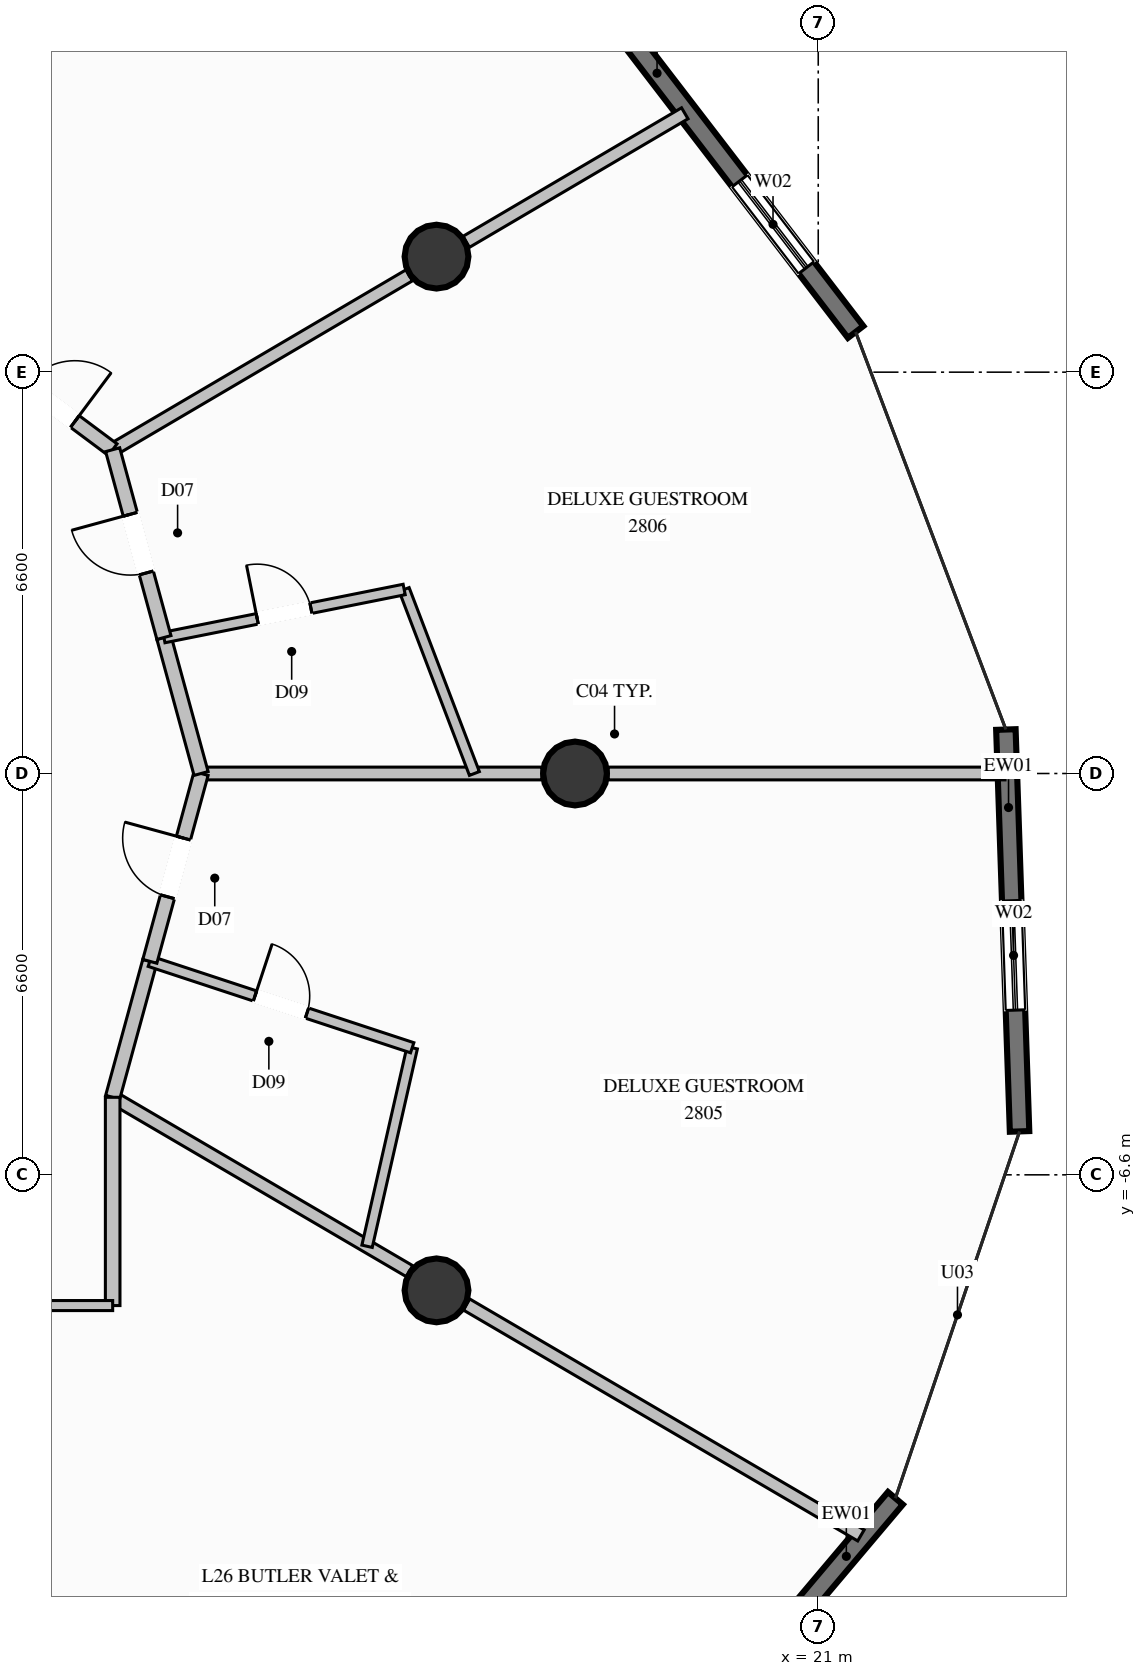
"""IFC4 building model, lengths in metres.
Left out: names, types, materials, properties, quantities, classifications, styles, units other than length and angle.
Written with IfcOpenShell. Run it as: python <this file> out.ifc"""

import sys

from ifc_helpers import new_model, si_unit, direction, frame, frame_2d, origin, origin_2d, place, context, subcontext, project, spatial, rectangle, circle, extrude, element, fill, save


model = new_model("IFC4")
c1 = context("Model", 3, precision=1e-05, world=origin(), true_north=direction((0.0, 1.0)))
c2 = subcontext(c1, "Body", "Model", "MODEL_VIEW")
j1 = project(units=[si_unit("LENGTHUNIT", "METRE"), si_unit("PLANEANGLEUNIT", "RADIAN")], contexts=[c1])
p1 = place(None, origin())
s1 = spatial("IfcSite", under=j1, at=p1, CompositionType="ELEMENT")
p2 = place(p1, origin())
s2 = spatial("IfcBuilding", under=s1, at=p2, CompositionType="ELEMENT")
p3 = place(p2, frame((0.0, 0.0, 106.2)))
s3 = spatial("IfcBuildingStorey", under=s2, at=p3, CompositionType="ELEMENT", Elevation=106.2)
for number, where, z_axis, x_axis in (
    (1, (17.0, 0.0, 0.0), (0.0, 0.0, 1.0), (1.0, 0.0, 0.0)),
    (2, (14.722, 8.5, 0.0), (0.0, 0.0, 1.0), (1.0, 0.0, 0.0)),
    (3, (14.722, -8.5, 0.0), (0.0, 0.0, 1.0), (1.0, 0.0, 0.0)),
):
    element("IfcColumn", number, at=place(p3, frame(where, z_axis=z_axis, x_axis=x_axis)), inside=s3, PredefinedType="COLUMN", context=c2, shape_type="SweptSolid", body=[
        extrude(circle(Radius=0.525, at=origin_2d()), origin(), (0.0, 0.0, 1.0), 3.6),
    ])
p4 = place(p3, frame((24.086, 0.723, 0.0), z_axis=(0.0, 0.0, 1.0), x_axis=(0.034040106065, -0.999420467661, 0.0)))
e4 = element("IfcWall", 4, at=p4, inside=s3, PredefinedType="SOLIDWALL", context=c2, shape_type="SweptSolid", body=[
    extrude(rectangle(XDim=6.613, YDim=0.32, at=frame_2d((3.306, 0.0))), origin(), (0.0, 0.0, 1.0), 3.35),
])
p5 = place(p4, frame((2.817, 0.0, 0.35)))
e5 = element("IfcOpeningElement", 5, at=p5, cuts=e4, PredefinedType="OPENING", context=c2, shape_type="SweptSolid", body=[
    extrude(rectangle(XDim=1.8, YDim=2.6, at=frame_2d((0.9, 1.3))), frame((0.0, 0.17, 0.0), z_axis=(0.0, -1.0, 0.0), x_axis=(1.0, 0.0, 0.0)), (0.0, 0.0, 1.0), 0.34),
])
p6 = place(p3, frame((17.142, 13.089, 0.0), z_axis=(0.0, 0.0, 1.0), x_axis=(0.608831916989, -0.793299247986, 0.0)))
e6 = element("IfcWall", 6, at=p6, inside=s3, PredefinedType="SOLIDWALL", context=c2, shape_type="SweptSolid", body=[
    extrude(rectangle(XDim=7.347, YDim=0.32, at=frame_2d((3.673, 0.0))), origin(), (0.0, 0.0, 1.0), 3.35),
])
p7 = place(p6, frame((4.215, 0.0, 0.35)))
e7 = element("IfcOpeningElement", 7, at=p7, cuts=e6, PredefinedType="OPENING", context=c2, shape_type="SweptSolid", body=[
    extrude(rectangle(XDim=1.8, YDim=2.6, at=frame_2d((0.9, 1.3))), frame((0.0, 0.17, 0.0), z_axis=(0.0, -1.0, 0.0), x_axis=(1.0, 0.0, 0.0)), (0.0, 0.0, 1.0), 0.34),
])
p8 = place(p3, frame((22.269, -11.919, 0.0), z_axis=(0.0, 0.0, 1.0), x_axis=(-0.645278763483, -0.763947195425, 0.0)))
e8 = element("IfcWall", 8, at=p8, inside=s3, PredefinedType="SOLIDWALL", context=c2, shape_type="SweptSolid", body=[
    extrude(rectangle(XDim=6.369, YDim=0.32, at=frame_2d((3.185, 0.0))), origin(), (0.0, 0.0, 1.0), 3.35),
])
p9 = place(p8, frame((2.751, 0.0, 0.35)))
e9 = element("IfcOpeningElement", 9, at=p9, cuts=e8, PredefinedType="OPENING", context=c2, shape_type="SweptSolid", body=[
    extrude(rectangle(XDim=1.8, YDim=2.6, at=frame_2d((0.9, 1.3))), frame((0.0, 0.17, 0.0), z_axis=(0.0, -1.0, 0.0), x_axis=(1.0, 0.0, 0.0)), (0.0, 0.0, 1.0), 0.34),
])
p10 = place(p3, frame((10.85, 0.0, 0.0), z_axis=(0.0, 0.0, 1.0), x_axis=(1.0, 0.0, 0.0)))
e10 = element("IfcWall", 10, at=p10, inside=s3, PredefinedType="PARTITIONING", context=c2, shape_type="SweptSolid", body=[
    extrude(rectangle(XDim=5.605, YDim=0.21, at=frame_2d((2.802, 0.0))), origin(), (0.0, 0.0, 1.0), 3.35),
])
p11 = place(p3, frame((17.545, 0.0, 0.0), z_axis=(0.0, 0.0, 1.0), x_axis=(1.0, 0.0, 0.0)))
e11 = element("IfcWall", 11, at=p11, inside=s3, PredefinedType="PARTITIONING", context=c2, shape_type="SweptSolid", body=[
    extrude(rectangle(XDim=6.526, YDim=0.21, at=frame_2d((3.263, 0.0))), origin(), (0.0, 0.0, 1.0), 3.35),
])
p12 = place(p3, frame((9.396, 5.325, 0.0), z_axis=(0.0, 0.0, 1.0), x_axis=(0.862032950085, 0.506852239778, 0.0)))
e12 = element("IfcWall", 12, at=p12, inside=s3, PredefinedType="PARTITIONING", context=c2, shape_type="SweptSolid", body=[
    extrude(rectangle(XDim=5.656, YDim=0.21, at=frame_2d((2.828, 0.0))), origin(), (0.0, 0.0, 1.0), 2.719),
])
p13 = place(p3, frame((15.21, 8.743, 0.0), z_axis=(0.0, 0.0, 1.0), x_axis=(0.862004936616, 0.506899880894, 0.0)))
e13 = element("IfcWall", 13, at=p13, inside=s3, PredefinedType="PARTITIONING", context=c2, shape_type="SweptSolid", body=[
    extrude(rectangle(XDim=4.17, YDim=0.21, at=frame_2d((2.085, 0.0))), origin(), (0.0, 0.0, 1.0), 3.35),
])
p14 = place(p3, frame((9.396, -5.325, 0.0), z_axis=(0.0, 0.0, 1.0), x_axis=(0.862912125579, -0.505353998232, 0.0)))
e14 = element("IfcWall", 14, at=p14, inside=s3, PredefinedType="PARTITIONING", context=c2, shape_type="SweptSolid", body=[
    extrude(rectangle(XDim=5.658, YDim=0.21, at=frame_2d((2.829, 0.0))), origin(), (0.0, 0.0, 1.0), 2.719),
])
p15 = place(p3, frame((15.215, -8.732, 0.0), z_axis=(0.0, 0.0, 1.0), x_axis=(0.862960241997, -0.505271828556, 0.0)))
e15 = element("IfcWall", 15, at=p15, inside=s3, PredefinedType="PARTITIONING", context=c2, shape_type="SweptSolid", body=[
    extrude(rectangle(XDim=7.517, YDim=0.21, at=frame_2d((3.758, 0.0))), origin(), (0.0, 0.0, 1.0), 3.35),
])
p16 = place(p3, frame((7.35, 6.85, 0.0), z_axis=(0.0, 0.0, 1.0), x_axis=(0.8017416961, -0.597670689205, 0.0)))
e16 = element("IfcWall", 16, at=p16, inside=s3, PredefinedType="PARTITIONING", context=c2, shape_type="SweptSolid", body=[
    extrude(rectangle(XDim=2.552, YDim=0.24, at=frame_2d((1.276, 0.0))), origin(), (0.0, 0.0, 1.0), 3.35),
])
p17 = place(p16, frame((0.776, 0.0, 0.0)))
e17 = element("IfcOpeningElement", 17, at=p17, cuts=e16, PredefinedType="OPENING", context=c2, shape_type="SweptSolid", body=[
    extrude(rectangle(XDim=1.0, YDim=2.2, at=frame_2d((0.5, 1.1))), frame((0.0, 0.13, 0.0), z_axis=(0.0, -1.0, 0.0), x_axis=(1.0, 0.0, 0.0)), (0.0, 0.0, 1.0), 0.26),
])
p18 = place(p3, frame((9.396, -5.325, 0.0), z_axis=(0.0, 0.0, 1.0), x_axis=(0.263643210908, 0.964620265878, 0.0)))
e18 = element("IfcWall", 18, at=p18, inside=s3, PredefinedType="PARTITIONING", context=c2, shape_type="SweptSolid", body=[
    extrude(rectangle(XDim=2.318, YDim=0.24, at=frame_2d((1.159, 0.0))), origin(), (0.0, 0.0, 1.0), 3.35),
])
p19 = place(p3, frame((13.58, -7.775, 0.0), z_axis=(0.0, 0.0, 1.0), x_axis=(0.221599041774, 0.975137869578, 0.0)))
e19 = element("IfcWall", 19, at=p19, inside=s3, PredefinedType="PLUMBINGWALL", context=c2, shape_type="SweptSolid", body=[
    extrude(rectangle(XDim=3.348, YDim=0.175, at=frame_2d((1.674, 0.0))), origin(), (0.0, 0.0, 1.0), 3.35),
])
p20 = place(p3, frame((10.007, -3.089, 0.0), z_axis=(0.0, 0.0, 1.0), x_axis=(0.949827092004, -0.312775471057, 0.0)))
e20 = element("IfcWall", 20, at=p20, inside=s3, PredefinedType="PLUMBINGWALL", context=c2, shape_type="SweptSolid", body=[
    extrude(rectangle(XDim=4.543, YDim=0.175, at=frame_2d((2.271, 0.0))), origin(), (0.0, 0.0, 1.0), 3.35),
])
p21 = place(p20, frame((1.821, 0.0, 0.0)))
e21 = element("IfcOpeningElement", 21, at=p21, cuts=e20, PredefinedType="OPENING", context=c2, shape_type="SweptSolid", body=[
    extrude(rectangle(XDim=0.9, YDim=2.1, at=frame_2d((0.45, 1.05))), frame((0.0, 0.098, 0.0), z_axis=(0.0, -1.0, 0.0), x_axis=(1.0, 0.0, 0.0)), (0.0, 0.0, 1.0), 0.195),
])
p22 = place(p3, frame((10.007, -3.089, 0.0), z_axis=(0.0, 0.0, 1.0), x_axis=(0.263272237376, 0.964721581093, 0.0)))
e22 = element("IfcWall", 22, at=p22, inside=s3, PredefinedType="PARTITIONING", context=c2, shape_type="SweptSolid", body=[
    extrude(rectangle(XDim=3.202, YDim=0.24, at=frame_2d((1.601, 0.0))), origin(), (0.0, 0.0, 1.0), 2.985),
])
p23 = place(p22, frame((1.101, 0.0, 0.0)))
e23 = element("IfcOpeningElement", 23, at=p23, cuts=e22, PredefinedType="OPENING", context=c2, shape_type="SweptSolid", body=[
    extrude(rectangle(XDim=1.0, YDim=2.2, at=frame_2d((0.5, 1.1))), frame((0.0, 0.13, 0.0), z_axis=(0.0, -1.0, 0.0), x_axis=(1.0, 0.0, 0.0)), (0.0, 0.0, 1.0), 0.26),
])
p24 = place(p3, frame((10.85, 0.0, 0.0), z_axis=(0.0, 0.0, 1.0), x_axis=(-0.263616426241, 0.964627586074, 0.0)))
e24 = element("IfcWall", 24, at=p24, inside=s3, PredefinedType="PARTITIONING", context=c2, shape_type="SweptSolid", body=[
    extrude(rectangle(XDim=2.318, YDim=0.24, at=frame_2d((1.159, 0.0))), origin(), (0.0, 0.0, 1.0), 2.985),
])
p25 = place(p3, frame((15.345, 0.0, 0.0), z_axis=(0.0, 0.0, 1.0), x_axis=(-0.35661902988, 0.934249895653, 0.0)))
e25 = element("IfcWall", 25, at=p25, inside=s3, PredefinedType="PLUMBINGWALL", context=c2, shape_type="SweptSolid", body=[
    extrude(rectangle(XDim=3.239, YDim=0.175, at=frame_2d((1.619, 0.0))), origin(), (0.0, 0.0, 1.0), 3.35),
])
p26 = place(p3, frame((10.239, 2.236, 0.0), z_axis=(0.0, 0.0, 1.0), x_axis=(0.980599315693, 0.196022912085, 0.0)))
e26 = element("IfcWall", 26, at=p26, inside=s3, PredefinedType="PLUMBINGWALL", context=c2, shape_type="SweptSolid", body=[
    extrude(rectangle(XDim=4.029, YDim=0.175, at=frame_2d((2.015, 0.0))), origin(), (0.0, 0.0, 1.0), 3.35),
])
p27 = place(p26, frame((1.565, 0.0, 0.0)))
e27 = element("IfcOpeningElement", 27, at=p27, cuts=e26, PredefinedType="OPENING", context=c2, shape_type="SweptSolid", body=[
    extrude(rectangle(XDim=0.9, YDim=2.1, at=frame_2d((0.45, 1.05))), frame((0.0, 0.098, 0.0), z_axis=(0.0, -1.0, 0.0), x_axis=(1.0, 0.0, 0.0)), (0.0, 0.0, 1.0), 0.195),
])
p28 = place(p3, frame((10.239, 2.236, 0.0), z_axis=(0.0, 0.0, 1.0), x_axis=(-0.26329160366, 0.964716295831, 0.0)))
e28 = element("IfcWall", 28, at=p28, inside=s3, PredefinedType="PARTITIONING", context=c2, shape_type="SweptSolid", body=[
    extrude(rectangle(XDim=3.202, YDim=0.24, at=frame_2d((1.601, 0.0))), origin(), (0.0, 0.0, 1.0), 3.35),
])
p29 = place(p28, frame((1.101, 0.0, 0.0)))
e29 = element("IfcOpeningElement", 29, at=p29, cuts=e28, PredefinedType="OPENING", context=c2, shape_type="SweptSolid", body=[
    extrude(rectangle(XDim=1.0, YDim=2.2, at=frame_2d((0.5, 1.1))), frame((0.0, 0.13, 0.0), z_axis=(0.0, -1.0, 0.0), x_axis=(1.0, 0.0, 0.0)), (0.0, 0.0, 1.0), 0.26),
])
p30 = place(p3, frame((5.168, -8.75, 0.0), z_axis=(0.0, 0.0, 1.0), x_axis=(0.319791389232, -0.947487977429, 0.0)))
e30 = element("IfcWall", 30, at=p30, inside=s3, PredefinedType="PARTITIONING", context=c2, shape_type="SweptSolid", body=[
    extrude(rectangle(XDim=12.468, YDim=0.21, at=frame_2d((6.234, 0.0))), origin(), (0.0, 0.0, 1.0), 3.35),
])
p31 = place(p3, frame((9.396, -8.75, 0.0), z_axis=(0.0, 0.0, 1.0), x_axis=(0.0, 1.0, 0.0)))
e31 = element("IfcWall", 31, at=p31, inside=s3, PredefinedType="PARTITIONING", context=c2, shape_type="SweptSolid", body=[
    extrude(rectangle(XDim=3.425, YDim=0.24, at=frame_2d((1.712, 0.0))), origin(), (0.0, 0.0, 1.0), 3.35),
])
p32 = place(p3, frame((5.168, -8.75, 0.0), z_axis=(0.0, 0.0, 1.0), x_axis=(1.0, 0.0, 0.0)))
e32 = element("IfcWall", 32, at=p32, inside=s3, PredefinedType="PARTITIONING", context=c2, shape_type="SweptSolid", body=[
    extrude(rectangle(XDim=4.228, YDim=0.165, at=frame_2d((2.114, 0.0))), origin(), (0.0, 0.0, 1.0), 3.35),
])
p33 = place(p32, frame((1.639, 0.0, 0.0)))
e33 = element("IfcOpeningElement", 33, at=p33, cuts=e32, PredefinedType="OPENING", context=c2, shape_type="SweptSolid", body=[
    extrude(rectangle(XDim=0.95, YDim=2.1, at=frame_2d((0.475, 1.05))), frame((0.0, 0.093, 0.0), z_axis=(0.0, -1.0, 0.0), x_axis=(1.0, 0.0, 0.0)), (0.0, 0.0, 1.0), 0.185),
])
p34 = place(p5, origin())
e34 = element("IfcWindow", 34, at=p34, inside=s3, PartitioningType="SINGLE_PANEL", PredefinedType="WINDOW", context=c2, shape_type="SweptSolid", body=[
    extrude(rectangle(XDim=1.8, YDim=2.6, at=frame_2d((0.9, 1.3))), frame((0.0, 0.03, 0.0), z_axis=(0.0, -1.0, 0.0), x_axis=(1.0, 0.0, 0.0)), (0.0, 0.0, 1.0), 0.06),
])
fill(e5, e34)
p35 = place(p7, origin())
e35 = element("IfcWindow", 35, at=p35, inside=s3, PartitioningType="SINGLE_PANEL", PredefinedType="WINDOW", context=c2, shape_type="SweptSolid", body=[
    extrude(rectangle(XDim=1.8, YDim=2.6, at=frame_2d((0.9, 1.3))), frame((0.0, 0.03, 0.0), z_axis=(0.0, -1.0, 0.0), x_axis=(1.0, 0.0, 0.0)), (0.0, 0.0, 1.0), 0.06),
])
fill(e7, e35)
p36 = place(p17, origin())
e36 = element("IfcDoor", 36, at=p36, inside=s3, OperationType="SINGLE_SWING_RIGHT", PredefinedType="DOOR", context=c2, shape_type="SweptSolid", body=[
    extrude(rectangle(XDim=1.0, YDim=2.2, at=frame_2d((0.5, 1.1))), frame((0.0, 0.025, 0.0), z_axis=(0.0, -1.0, 0.0), x_axis=(1.0, 0.0, 0.0)), (0.0, 0.0, 1.0), 0.05),
])
fill(e17, e36)
p37 = place(p21, origin())
e37 = element("IfcDoor", 37, at=p37, inside=s3, OperationType="SINGLE_SWING_LEFT", PredefinedType="DOOR", context=c2, shape_type="SweptSolid", body=[
    extrude(rectangle(XDim=0.9, YDim=2.1, at=frame_2d((0.45, 1.05))), frame((0.0, 0.025, 0.0), z_axis=(0.0, -1.0, 0.0), x_axis=(1.0, 0.0, 0.0)), (0.0, 0.0, 1.0), 0.05),
])
fill(e21, e37)
p38 = place(p23, origin())
e38 = element("IfcDoor", 38, at=p38, inside=s3, OperationType="SINGLE_SWING_RIGHT", PredefinedType="DOOR", context=c2, shape_type="SweptSolid", body=[
    extrude(rectangle(XDim=1.0, YDim=2.2, at=frame_2d((0.5, 1.1))), frame((0.0, 0.025, 0.0), z_axis=(0.0, -1.0, 0.0), x_axis=(1.0, 0.0, 0.0)), (0.0, 0.0, 1.0), 0.05),
])
fill(e23, e38)
p39 = place(p27, origin())
e39 = element("IfcDoor", 39, at=p39, inside=s3, OperationType="SINGLE_SWING_LEFT", PredefinedType="DOOR", context=c2, shape_type="SweptSolid", body=[
    extrude(rectangle(XDim=0.9, YDim=2.1, at=frame_2d((0.45, 1.05))), frame((0.0, 0.025, 0.0), z_axis=(0.0, -1.0, 0.0), x_axis=(1.0, 0.0, 0.0)), (0.0, 0.0, 1.0), 0.05),
])
fill(e27, e39)
p40 = place(p29, origin())
e40 = element("IfcDoor", 40, at=p40, inside=s3, OperationType="SINGLE_SWING_RIGHT", PredefinedType="DOOR", context=c2, shape_type="SweptSolid", body=[
    extrude(rectangle(XDim=1.0, YDim=2.2, at=frame_2d((0.5, 1.1))), frame((0.0, 0.025, 0.0), z_axis=(0.0, -1.0, 0.0), x_axis=(1.0, 0.0, 0.0)), (0.0, 0.0, 1.0), 0.05),
])
fill(e29, e40)
save(model, sys.argv[1])
